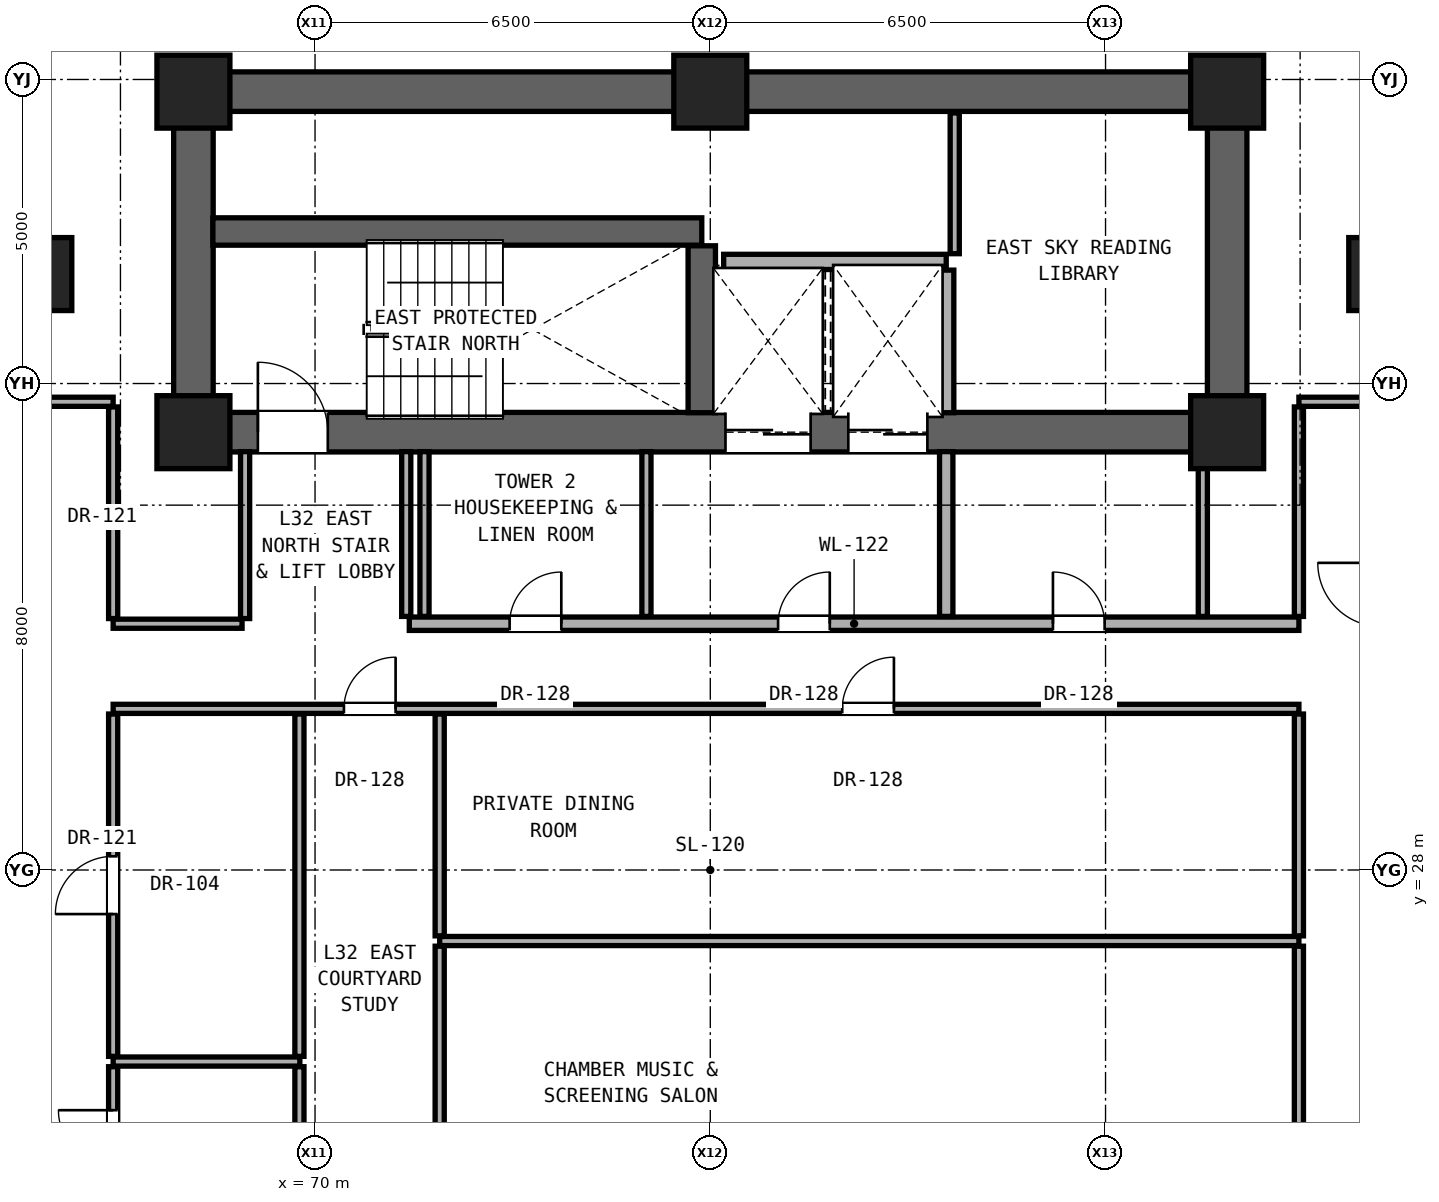
"""IFC4 building model, lengths in metres.
Left out: names, types, materials, properties, quantities, classifications, styles, units other than length and angle.
Written with IfcOpenShell. Run it as: python <this file> out.ifc"""

import sys

from ifc_helpers import new_model, si_unit, direction, frame, frame_2d, origin, origin_2d, place, context, subcontext, project, spatial, rectangle, extrude, element, fill, save


model = new_model("IFC4")
c1 = context("Model", 3, precision=1e-05, world=origin(), true_north=direction((0.0, 1.0)))
c2 = subcontext(c1, "Body", "Model", "MODEL_VIEW")
j1 = project(units=[si_unit("LENGTHUNIT", "METRE"), si_unit("PLANEANGLEUNIT", "RADIAN")], contexts=[c1])
p1 = place(None, origin())
s1 = spatial("IfcSite", under=j1, at=p1, CompositionType="ELEMENT")
p2 = place(p1, origin())
s2 = spatial("IfcBuilding", under=s1, at=p2, CompositionType="ELEMENT")
p3 = place(p2, frame((0.0, 0.0, 114.8)))
s3 = spatial("IfcBuildingStorey", under=s2, at=p3, CompositionType="ELEMENT", Elevation=114.8)
for number, where, z_axis, x_axis in (
    (1, (68.0, 35.2, 0.0), (0.0, 0.0, 1.0), (1.0, 0.0, 0.0)),
    (2, (85.0, 35.2, 0.0), (0.0, 0.0, 1.0), (1.0, 0.0, 0.0)),
    (3, (68.0, 40.8, 0.0), (0.0, 0.0, 1.0), (1.0, 0.0, 0.0)),
    (4, (76.5, 40.8, 0.0), (0.0, 0.0, 1.0), (1.0, 0.0, 0.0)),
    (5, (85.0, 40.8, 0.0), (0.0, 0.0, 1.0), (1.0, 0.0, 0.0)),
):
    element("IfcColumn", number, at=place(p3, frame(where, z_axis=z_axis, x_axis=x_axis)), inside=s3, PredefinedType="COLUMN", context=c2, shape_type="SweptSolid", body=[
        extrude(rectangle(XDim=1.2, YDim=1.2, at=origin_2d()), origin(), (0.0, 0.0, 1.0), 3.3),
    ])
for number, where, z_axis, x_axis in (
    (6, (65.6, 37.8, 0.0), (0.0, 0.0, 1.0), (1.0, 0.0, 0.0)),
    (7, (87.4, 37.8, 0.0), (0.0, 0.0, 1.0), (1.0, 0.0, 0.0)),
):
    element("IfcColumn", number, at=place(p3, frame(where, z_axis=z_axis, x_axis=x_axis)), inside=s3, PredefinedType="PILASTER", context=c2, shape_type="SweptSolid", body=[
        extrude(rectangle(XDim=0.8, YDim=1.2, at=origin_2d()), origin(), (0.0, 0.0, 1.0), 3.3),
    ])
p4 = place(p3, frame((68.0, 40.8, 0.0), z_axis=(0.0, 0.0, 1.0), x_axis=(1.0, 0.0, 0.0)))
e8 = element("IfcWall", 8, at=p4, inside=s3, PredefinedType="SHEAR", context=c2, shape_type="SweptSolid", body=[
    extrude(rectangle(XDim=17.0, YDim=0.65, at=frame_2d((8.5, 0.0))), origin(), (0.0, 0.0, 1.0), 3.08),
])
for number, where, z_axis, x_axis in (
    (9, (68.0, 35.2, 0.0), (0.0, 0.0, 1.0), (0.0, 1.0, 0.0)),
    (10, (85.0, 35.2, 0.0), (0.0, 0.0, 1.0), (0.0, 1.0, 0.0)),
):
    element("IfcWall", number, at=place(p3, frame(where, z_axis=z_axis, x_axis=x_axis)), inside=s3, PredefinedType="SHEAR", context=c2, shape_type="SweptSolid", body=[
        extrude(rectangle(XDim=5.6, YDim=0.65, at=frame_2d((2.8, 0.0))), origin(), (0.0, 0.0, 1.0), 3.08),
    ])
p5 = place(p3, frame((68.0, 35.2, 0.0), z_axis=(0.0, 0.0, 1.0), x_axis=(1.0, 0.0, 0.0)))
e11 = element("IfcWall", 11, at=p5, inside=s3, PredefinedType="SHEAR", context=c2, shape_type="SweptSolid", body=[
    extrude(rectangle(XDim=17.0, YDim=0.65, at=frame_2d((8.5, 0.0))), origin(), (0.0, 0.0, 1.0), 3.08),
])
p6 = place(p5, frame((1.06, 0.0, 0.0)))
e12 = element("IfcOpeningElement", 12, at=p6, cuts=e11, PredefinedType="OPENING", context=c2, shape_type="SweptSolid", body=[
    extrude(rectangle(XDim=1.15, YDim=2.2, at=frame_2d((0.575, 1.1))), frame((0.0, 0.335, 0.0), z_axis=(0.0, -1.0, 0.0), x_axis=(1.0, 0.0, 0.0)), (0.0, 0.0, 1.0), 0.67),
])
p7 = place(p5, frame((8.75, 0.0, 0.0)))
e13 = element("IfcOpeningElement", 13, at=p7, cuts=e11, PredefinedType="OPENING", context=c2, shape_type="SweptSolid", body=[
    extrude(rectangle(XDim=1.4, YDim=2.35, at=frame_2d((0.7, 1.175))), frame((0.0, 0.335, 0.0), z_axis=(0.0, -1.0, 0.0), x_axis=(1.0, 0.0, 0.0)), (0.0, 0.0, 1.0), 0.67),
])
p8 = place(p5, frame((10.77, 0.0, 0.0)))
e14 = element("IfcOpeningElement", 14, at=p8, cuts=e11, PredefinedType="OPENING", context=c2, shape_type="SweptSolid", body=[
    extrude(rectangle(XDim=1.3, YDim=2.3, at=frame_2d((0.65, 1.15))), frame((0.0, 0.335, 0.0), z_axis=(0.0, -1.0, 0.0), x_axis=(1.0, 0.0, 0.0)), (0.0, 0.0, 1.0), 0.67),
])
p9 = place(p3, frame((66.68, 24.85, 0.0), z_axis=(0.0, 0.0, 1.0), x_axis=(1.0, 0.0, 0.0)))
e15 = element("IfcWall", 15, at=p9, inside=s3, PredefinedType="PARTITIONING", context=c2, shape_type="SweptSolid", body=[
    extrude(rectangle(XDim=3.07, YDim=0.15, at=frame_2d((1.535, 0.0))), origin(), (0.0, 0.0, 1.0), 2.145),
])
p10 = place(p3, frame((72.05, 26.832, 0.0), z_axis=(0.0, 0.0, 1.0), x_axis=(1.0, 0.0, 0.0)))
e16 = element("IfcWall", 16, at=p10, inside=s3, PredefinedType="PARTITIONING", context=c2, shape_type="SweptSolid", body=[
    extrude(rectangle(XDim=14.13, YDim=0.15, at=frame_2d((7.065, 0.0))), origin(), (0.0, 0.0, 1.0), 2.145),
])
p11 = place(p3, frame((66.68, 30.65, 0.0), z_axis=(0.0, 0.0, 1.0), x_axis=(1.0, 0.0, 0.0)))
e17 = element("IfcWall", 17, at=p11, inside=s3, PredefinedType="PARTITIONING", context=c2, shape_type="SweptSolid", body=[
    extrude(rectangle(XDim=19.5, YDim=0.15, at=frame_2d((9.75, 0.0))), origin(), (0.0, 0.0, 1.0), 2.145),
])
p12 = place(p11, frame((3.795, 0.0, 0.0)))
e18 = element("IfcOpeningElement", 18, at=p12, cuts=e17, PredefinedType="OPENING", context=c2, shape_type="SweptSolid", body=[
    extrude(rectangle(XDim=0.85, YDim=2.01, at=frame_2d((0.425, 1.005))), frame((0.0, 0.085, 0.0), z_axis=(0.0, -1.0, 0.0), x_axis=(1.0, 0.0, 0.0)), (0.0, 0.0, 1.0), 0.17),
])
p13 = place(p11, frame((11.99, 0.0, 0.0)))
e19 = element("IfcOpeningElement", 19, at=p13, cuts=e17, PredefinedType="OPENING", context=c2, shape_type="SweptSolid", body=[
    extrude(rectangle(XDim=0.85, YDim=2.01, at=frame_2d((0.425, 1.005))), frame((0.0, 0.085, 0.0), z_axis=(0.0, -1.0, 0.0), x_axis=(1.0, 0.0, 0.0)), (0.0, 0.0, 1.0), 0.17),
])
p14 = place(p3, frame((66.68, 32.05, 0.0), z_axis=(0.0, 0.0, 1.0), x_axis=(1.0, 0.0, 0.0)))
e20 = element("IfcWall", 20, at=p14, inside=s3, PredefinedType="PARTITIONING", context=c2, shape_type="SweptSolid", body=[
    extrude(rectangle(XDim=2.12, YDim=0.15, at=frame_2d((1.06, 0.0))), origin(), (0.0, 0.0, 1.0), 2.145),
])
p15 = place(p3, frame((71.55, 32.05, 0.0), z_axis=(0.0, 0.0, 1.0), x_axis=(1.0, 0.0, 0.0)))
e21 = element("IfcWall", 21, at=p15, inside=s3, PredefinedType="SOLIDWALL", context=c2, shape_type="SweptSolid", body=[
    extrude(rectangle(XDim=14.63, YDim=0.22, at=frame_2d((7.315, 0.0))), origin(), (0.0, 0.0, 1.0), 2.145),
])
p16 = place(p15, frame((6.065, 0.0, 0.0)))
e22 = element("IfcOpeningElement", 22, at=p16, cuts=e21, PredefinedType="OPENING", context=c2, shape_type="SweptSolid", body=[
    extrude(rectangle(XDim=0.85, YDim=2.01, at=frame_2d((0.425, 1.005))), frame((0.0, 0.12, 0.0), z_axis=(0.0, -1.0, 0.0), x_axis=(1.0, 0.0, 0.0)), (0.0, 0.0, 1.0), 0.24),
])
p17 = place(p15, frame((10.585, 0.0, 0.0)))
e23 = element("IfcOpeningElement", 23, at=p17, cuts=e21, PredefinedType="OPENING", context=c2, shape_type="SweptSolid", body=[
    extrude(rectangle(XDim=0.85, YDim=2.01, at=frame_2d((0.425, 1.005))), frame((0.0, 0.12, 0.0), z_axis=(0.0, -1.0, 0.0), x_axis=(1.0, 0.0, 0.0)), (0.0, 0.0, 1.0), 0.24),
])
p18 = place(p15, frame((1.65, 0.0, 0.0)))
e24 = element("IfcOpeningElement", 24, at=p18, cuts=e21, PredefinedType="OPENING", context=c2, shape_type="SweptSolid", body=[
    extrude(rectangle(XDim=0.85, YDim=2.01, at=frame_2d((0.425, 1.005))), frame((0.0, 0.12, 0.0), z_axis=(0.0, -1.0, 0.0), x_axis=(1.0, 0.0, 0.0)), (0.0, 0.0, 1.0), 0.24),
])
p19 = place(p3, frame((65.32, 35.7, 0.0), z_axis=(0.0, 0.0, 1.0), x_axis=(1.0, 0.0, 0.0)))
e25 = element("IfcWall", 25, at=p19, inside=s3, PredefinedType="PARTITIONING", context=c2, shape_type="SweptSolid", body=[
    extrude(rectangle(XDim=1.36, YDim=0.15, at=frame_2d((0.68, 0.0))), origin(), (0.0, 0.0, 1.0), 3.08),
])
p20 = place(p3, frame((86.18, 35.7, 0.0), z_axis=(0.0, 0.0, 1.0), x_axis=(1.0, 0.0, 0.0)))
e26 = element("IfcWall", 26, at=p20, inside=s3, PredefinedType="PARTITIONING", context=c2, shape_type="SweptSolid", body=[
    extrude(rectangle(XDim=1.36, YDim=0.15, at=frame_2d((0.68, 0.0))), origin(), (0.0, 0.0, 1.0), 3.08),
])
p21 = place(p3, frame((76.72, 38.0, 0.0), z_axis=(0.0, 0.0, 1.0), x_axis=(1.0, 0.0, 0.0)))
e27 = element("IfcWall", 27, at=p21, inside=s3, PredefinedType="SOLIDWALL", context=c2, shape_type="SweptSolid", body=[
    extrude(rectangle(XDim=3.66, YDim=0.25, at=frame_2d((1.83, 0.0))), origin(), (0.0, 0.0, 1.0), 3.08),
])
p22 = place(p3, frame((68.32, 38.5, 0.0), z_axis=(0.0, 0.0, 1.0), x_axis=(1.0, 0.0, 0.0)))
e28 = element("IfcWall", 28, at=p22, inside=s3, PredefinedType="SHEAR", context=c2, shape_type="SweptSolid", body=[
    extrude(rectangle(XDim=8.04, YDim=0.45, at=frame_2d((4.02, 0.0))), origin(), (0.0, 0.0, 1.0), 3.08),
])
p23 = place(p3, frame((66.68, 22.435, 0.0), z_axis=(0.0, 0.0, 1.0), x_axis=(0.0, 1.0, 0.0)))
e29 = element("IfcWall", 29, at=p23, inside=s3, PredefinedType="PARTITIONING", context=c2, shape_type="SweptSolid", body=[
    extrude(rectangle(XDim=2.33, YDim=0.15, at=frame_2d((1.165, 0.0))), origin(), (0.0, 0.0, 1.0), 3.08),
])
p24 = place(p23, frame((0.715, 0.0, 0.0)))
e30 = element("IfcOpeningElement", 30, at=p24, cuts=e29, PredefinedType="OPENING", context=c2, shape_type="SweptSolid", body=[
    extrude(rectangle(XDim=0.9, YDim=2.1, at=frame_2d((0.45, 1.05))), frame((0.0, 0.085, 0.0), z_axis=(0.0, -1.0, 0.0), x_axis=(1.0, 0.0, 0.0)), (0.0, 0.0, 1.0), 0.17),
])
p25 = place(p3, frame((66.68, 24.935, 0.0), z_axis=(0.0, 0.0, 1.0), x_axis=(0.0, 1.0, 0.0)))
e31 = element("IfcWall", 31, at=p25, inside=s3, PredefinedType="PARTITIONING", context=c2, shape_type="SweptSolid", body=[
    extrude(rectangle(XDim=5.63, YDim=0.15, at=frame_2d((2.815, 0.0))), origin(), (0.0, 0.0, 1.0), 2.299),
])
p26 = place(p25, frame((2.34, 0.0, 0.0)))
e32 = element("IfcOpeningElement", 32, at=p26, cuts=e31, PredefinedType="OPENING", context=c2, shape_type="SweptSolid", body=[
    extrude(rectangle(XDim=0.95, YDim=2.15, at=frame_2d((0.475, 1.075))), frame((0.0, 0.085, 0.0), z_axis=(0.0, -1.0, 0.0), x_axis=(1.0, 0.0, 0.0)), (0.0, 0.0, 1.0), 0.17),
])
p27 = place(p3, frame((66.68, 32.135, 0.0), z_axis=(0.0, 0.0, 1.0), x_axis=(0.0, 1.0, 0.0)))
e33 = element("IfcWall", 33, at=p27, inside=s3, PredefinedType="PARTITIONING", context=c2, shape_type="SweptSolid", body=[
    extrude(rectangle(XDim=3.48, YDim=0.15, at=frame_2d((1.74, 0.0))), origin(), (0.0, 0.0, 1.0), 2.472),
])
p28 = place(p3, frame((68.85, 32.135, 0.0), z_axis=(0.0, 0.0, 1.0), x_axis=(0.0, 1.0, 0.0)))
e34 = element("IfcWall", 34, at=p28, inside=s3, PredefinedType="PARTITIONING", context=c2, shape_type="SweptSolid", body=[
    extrude(rectangle(XDim=2.745, YDim=0.15, at=frame_2d((1.373, 0.0))), origin(), (0.0, 0.0, 1.0), 3.08),
])
p29 = place(p3, frame((69.743, 22.435, 0.0), z_axis=(0.0, 0.0, 1.0), x_axis=(0.0, 1.0, 0.0)))
e35 = element("IfcWall", 35, at=p29, inside=s3, PredefinedType="PARTITIONING", context=c2, shape_type="SweptSolid", body=[
    extrude(rectangle(XDim=2.33, YDim=0.15, at=frame_2d((1.165, 0.0))), origin(), (0.0, 0.0, 1.0), 3.08),
])
p30 = place(p3, frame((69.743, 24.935, 0.0), z_axis=(0.0, 0.0, 1.0), x_axis=(0.0, 1.0, 0.0)))
e36 = element("IfcWall", 36, at=p30, inside=s3, PredefinedType="PARTITIONING", context=c2, shape_type="SweptSolid", body=[
    extrude(rectangle(XDim=5.63, YDim=0.15, at=frame_2d((2.815, 0.0))), origin(), (0.0, 0.0, 1.0), 2.145),
])
for number, where, z_axis, x_axis in (
    (37, (71.5, 32.17, 0.0), (0.0, 0.0, 1.0), (0.0, 1.0, 0.0)),
    (38, (71.8, 32.17, 0.0), (0.0, 0.0, 1.0), (0.0, 1.0, 0.0)),
):
    element("IfcWall", number, at=place(p3, frame(where, z_axis=z_axis, x_axis=x_axis)), inside=s3, PredefinedType="PARTITIONING", context=c2, shape_type="SweptSolid", body=[
        extrude(rectangle(XDim=2.71, YDim=0.15, at=frame_2d((1.355, 0.0))), origin(), (0.0, 0.0, 1.0), 3.08),
    ])
p31 = place(p3, frame((72.05, 22.435, 0.0), z_axis=(0.0, 0.0, 1.0), x_axis=(0.0, 1.0, 0.0)))
e39 = element("IfcWall", 39, at=p31, inside=s3, PredefinedType="PARTITIONING", context=c2, shape_type="SweptSolid", body=[
    extrude(rectangle(XDim=4.312, YDim=0.15, at=frame_2d((2.156, 0.0))), origin(), (0.0, 0.0, 1.0), 2.609),
])
p32 = place(p3, frame((72.05, 26.917, 0.0), z_axis=(0.0, 0.0, 1.0), x_axis=(0.0, 1.0, 0.0)))
e40 = element("IfcWall", 40, at=p32, inside=s3, PredefinedType="PARTITIONING", context=c2, shape_type="SweptSolid", body=[
    extrude(rectangle(XDim=3.648, YDim=0.15, at=frame_2d((1.824, 0.0))), origin(), (0.0, 0.0, 1.0), 2.145),
])
p33 = place(p3, frame((75.45, 32.17, 0.0), z_axis=(0.0, 0.0, 1.0), x_axis=(0.0, 1.0, 0.0)))
e41 = element("IfcWall", 41, at=p33, inside=s3, PredefinedType="PARTITIONING", context=c2, shape_type="SweptSolid", body=[
    extrude(rectangle(XDim=2.71, YDim=0.15, at=frame_2d((1.355, 0.0))), origin(), (0.0, 0.0, 1.0), 3.08),
])
p34 = place(p3, frame((76.36, 35.52, 0.0), z_axis=(0.0, 0.0, 1.0), x_axis=(0.0, 1.0, 0.0)))
e42 = element("IfcWall", 42, at=p34, inside=s3, PredefinedType="SHEAR", context=c2, shape_type="SweptSolid", body=[
    extrude(rectangle(XDim=2.745, YDim=0.45, at=frame_2d((1.373, 0.0))), origin(), (0.0, 0.0, 1.0), 3.08),
])
p35 = place(p3, frame((80.38, 32.17, 0.0), z_axis=(0.0, 0.0, 1.0), x_axis=(0.0, 1.0, 0.0)))
e43 = element("IfcWall", 43, at=p35, inside=s3, PredefinedType="SOLIDWALL", context=c2, shape_type="SweptSolid", body=[
    extrude(rectangle(XDim=2.71, YDim=0.22, at=frame_2d((1.355, 0.0))), origin(), (0.0, 0.0, 1.0), 3.08),
])
p36 = place(p3, frame((80.38, 35.52, 0.0), z_axis=(0.0, 0.0, 1.0), x_axis=(0.0, 1.0, 0.0)))
e44 = element("IfcWall", 44, at=p36, inside=s3, PredefinedType="SOLIDWALL", context=c2, shape_type="SweptSolid", body=[
    extrude(rectangle(XDim=2.345, YDim=0.25, at=frame_2d((1.172, 0.0))), origin(), (0.0, 0.0, 1.0), 3.08),
])
p37 = place(p3, frame((80.52, 38.135, 0.0), z_axis=(0.0, 0.0, 1.0), x_axis=(0.0, 1.0, 0.0)))
e45 = element("IfcWall", 45, at=p37, inside=s3, PredefinedType="PARTITIONING", context=c2, shape_type="SweptSolid", body=[
    extrude(rectangle(XDim=2.315, YDim=0.15, at=frame_2d((1.157, 0.0))), origin(), (0.0, 0.0, 1.0), 3.08),
])
p38 = place(p3, frame((84.6, 32.17, 0.0), z_axis=(0.0, 0.0, 1.0), x_axis=(0.0, 1.0, 0.0)))
e46 = element("IfcWall", 46, at=p38, inside=s3, PredefinedType="PARTITIONING", context=c2, shape_type="SweptSolid", body=[
    extrude(rectangle(XDim=2.71, YDim=0.15, at=frame_2d((1.355, 0.0))), origin(), (0.0, 0.0, 1.0), 3.08),
])
p39 = place(p3, frame((86.18, 22.435, 0.0), z_axis=(0.0, 0.0, 1.0), x_axis=(0.0, 1.0, 0.0)))
e47 = element("IfcWall", 47, at=p39, inside=s3, PredefinedType="PARTITIONING", context=c2, shape_type="SweptSolid", body=[
    extrude(rectangle(XDim=4.312, YDim=0.15, at=frame_2d((2.156, 0.0))), origin(), (0.0, 0.0, 1.0), 3.08),
])
p40 = place(p3, frame((86.18, 26.917, 0.0), z_axis=(0.0, 0.0, 1.0), x_axis=(0.0, 1.0, 0.0)))
e48 = element("IfcWall", 48, at=p40, inside=s3, PredefinedType="PARTITIONING", context=c2, shape_type="SweptSolid", body=[
    extrude(rectangle(XDim=3.648, YDim=0.15, at=frame_2d((1.824, 0.0))), origin(), (0.0, 0.0, 1.0), 2.299),
])
p41 = place(p3, frame((86.18, 32.17, 0.0), z_axis=(0.0, 0.0, 1.0), x_axis=(0.0, 1.0, 0.0)))
e49 = element("IfcWall", 49, at=p41, inside=s3, PredefinedType="PARTITIONING", context=c2, shape_type="SweptSolid", body=[
    extrude(rectangle(XDim=3.445, YDim=0.15, at=frame_2d((1.723, 0.0))), origin(), (0.0, 0.0, 1.0), 2.472),
])
p42 = place(p6, origin())
e50 = element("IfcDoor", 50, at=p42, inside=s3, OperationType="SINGLE_SWING_LEFT", PredefinedType="DOOR", context=c2, shape_type="SweptSolid", body=[
    extrude(rectangle(XDim=1.15, YDim=2.2, at=frame_2d((0.575, 1.1))), frame((0.0, 0.025, 0.0), z_axis=(0.0, -1.0, 0.0), x_axis=(1.0, 0.0, 0.0)), (0.0, 0.0, 1.0), 0.05),
])
fill(e12, e50)
p43 = place(p16, origin())
e51 = element("IfcDoor", 51, at=p43, inside=s3, OperationType="SINGLE_SWING_RIGHT", PredefinedType="DOOR", context=c2, shape_type="SweptSolid", body=[
    extrude(rectangle(XDim=0.85, YDim=2.01, at=frame_2d((0.425, 1.005))), frame((0.0, 0.025, 0.0), z_axis=(0.0, -1.0, 0.0), x_axis=(1.0, 0.0, 0.0)), (0.0, 0.0, 1.0), 0.05),
])
fill(e22, e51)
p44 = place(p17, origin())
e52 = element("IfcDoor", 52, at=p44, inside=s3, OperationType="SINGLE_SWING_LEFT", PredefinedType="DOOR", context=c2, shape_type="SweptSolid", body=[
    extrude(rectangle(XDim=0.85, YDim=2.01, at=frame_2d((0.425, 1.005))), frame((0.0, 0.025, 0.0), z_axis=(0.0, -1.0, 0.0), x_axis=(1.0, 0.0, 0.0)), (0.0, 0.0, 1.0), 0.05),
])
fill(e23, e52)
p45 = place(p18, origin())
e53 = element("IfcDoor", 53, at=p45, inside=s3, OperationType="SINGLE_SWING_RIGHT", PredefinedType="DOOR", context=c2, shape_type="SweptSolid", body=[
    extrude(rectangle(XDim=0.85, YDim=2.01, at=frame_2d((0.425, 1.005))), frame((0.0, 0.025, 0.0), z_axis=(0.0, -1.0, 0.0), x_axis=(1.0, 0.0, 0.0)), (0.0, 0.0, 1.0), 0.05),
])
fill(e24, e53)
p46 = place(p24, origin())
e54 = element("IfcDoor", 54, at=p46, inside=s3, OperationType="SINGLE_SWING_RIGHT", PredefinedType="DOOR", context=c2, shape_type="SweptSolid", body=[
    extrude(rectangle(XDim=0.9, YDim=2.1, at=frame_2d((0.45, 1.05))), frame((0.0, 0.025, 0.0), z_axis=(0.0, -1.0, 0.0), x_axis=(1.0, 0.0, 0.0)), (0.0, 0.0, 1.0), 0.05),
])
fill(e30, e54)
p47 = place(p26, origin())
e55 = element("IfcDoor", 55, at=p47, inside=s3, OperationType="SINGLE_SWING_LEFT", PredefinedType="DOOR", context=c2, shape_type="SweptSolid", body=[
    extrude(rectangle(XDim=0.95, YDim=2.15, at=frame_2d((0.475, 1.075))), frame((0.0, 0.025, 0.0), z_axis=(0.0, -1.0, 0.0), x_axis=(1.0, 0.0, 0.0)), (0.0, 0.0, 1.0), 0.05),
])
fill(e32, e55)
p48 = place(p12, origin())
e56 = element("IfcDoor", 56, at=p48, inside=s3, OperationType="SINGLE_SWING_RIGHT", PredefinedType="DOOR", context=c2, shape_type="SweptSolid", body=[
    extrude(rectangle(XDim=0.85, YDim=2.01, at=frame_2d((0.425, 1.005))), frame((0.0, 0.025, 0.0), z_axis=(0.0, -1.0, 0.0), x_axis=(1.0, 0.0, 0.0)), (0.0, 0.0, 1.0), 0.05),
])
fill(e18, e56)
p49 = place(p13, origin())
e57 = element("IfcDoor", 57, at=p49, inside=s3, OperationType="SINGLE_SWING_RIGHT", PredefinedType="DOOR", context=c2, shape_type="SweptSolid", body=[
    extrude(rectangle(XDim=0.85, YDim=2.01, at=frame_2d((0.425, 1.005))), frame((0.0, 0.025, 0.0), z_axis=(0.0, -1.0, 0.0), x_axis=(1.0, 0.0, 0.0)), (0.0, 0.0, 1.0), 0.05),
])
fill(e19, e57)
p50 = place(p7, origin())
e58 = element("IfcDoor", 58, at=p50, inside=s3, OperationType="DOUBLE_DOOR_SLIDING", PredefinedType="DOOR", context=c2, shape_type="SweptSolid", body=[
    extrude(rectangle(XDim=1.4, YDim=2.35, at=frame_2d((0.7, 1.175))), frame((0.0, 0.025, 0.0), z_axis=(0.0, -1.0, 0.0), x_axis=(1.0, 0.0, 0.0)), (0.0, 0.0, 1.0), 0.05),
])
fill(e13, e58)
p51 = place(p8, origin())
e59 = element("IfcDoor", 59, at=p51, inside=s3, OperationType="DOUBLE_DOOR_SLIDING", PredefinedType="DOOR", context=c2, shape_type="SweptSolid", body=[
    extrude(rectangle(XDim=1.3, YDim=2.3, at=frame_2d((0.65, 1.15))), frame((0.0, 0.025, 0.0), z_axis=(0.0, -1.0, 0.0), x_axis=(1.0, 0.0, 0.0)), (0.0, 0.0, 1.0), 0.05),
])
fill(e14, e59)
save(model, sys.argv[1])
